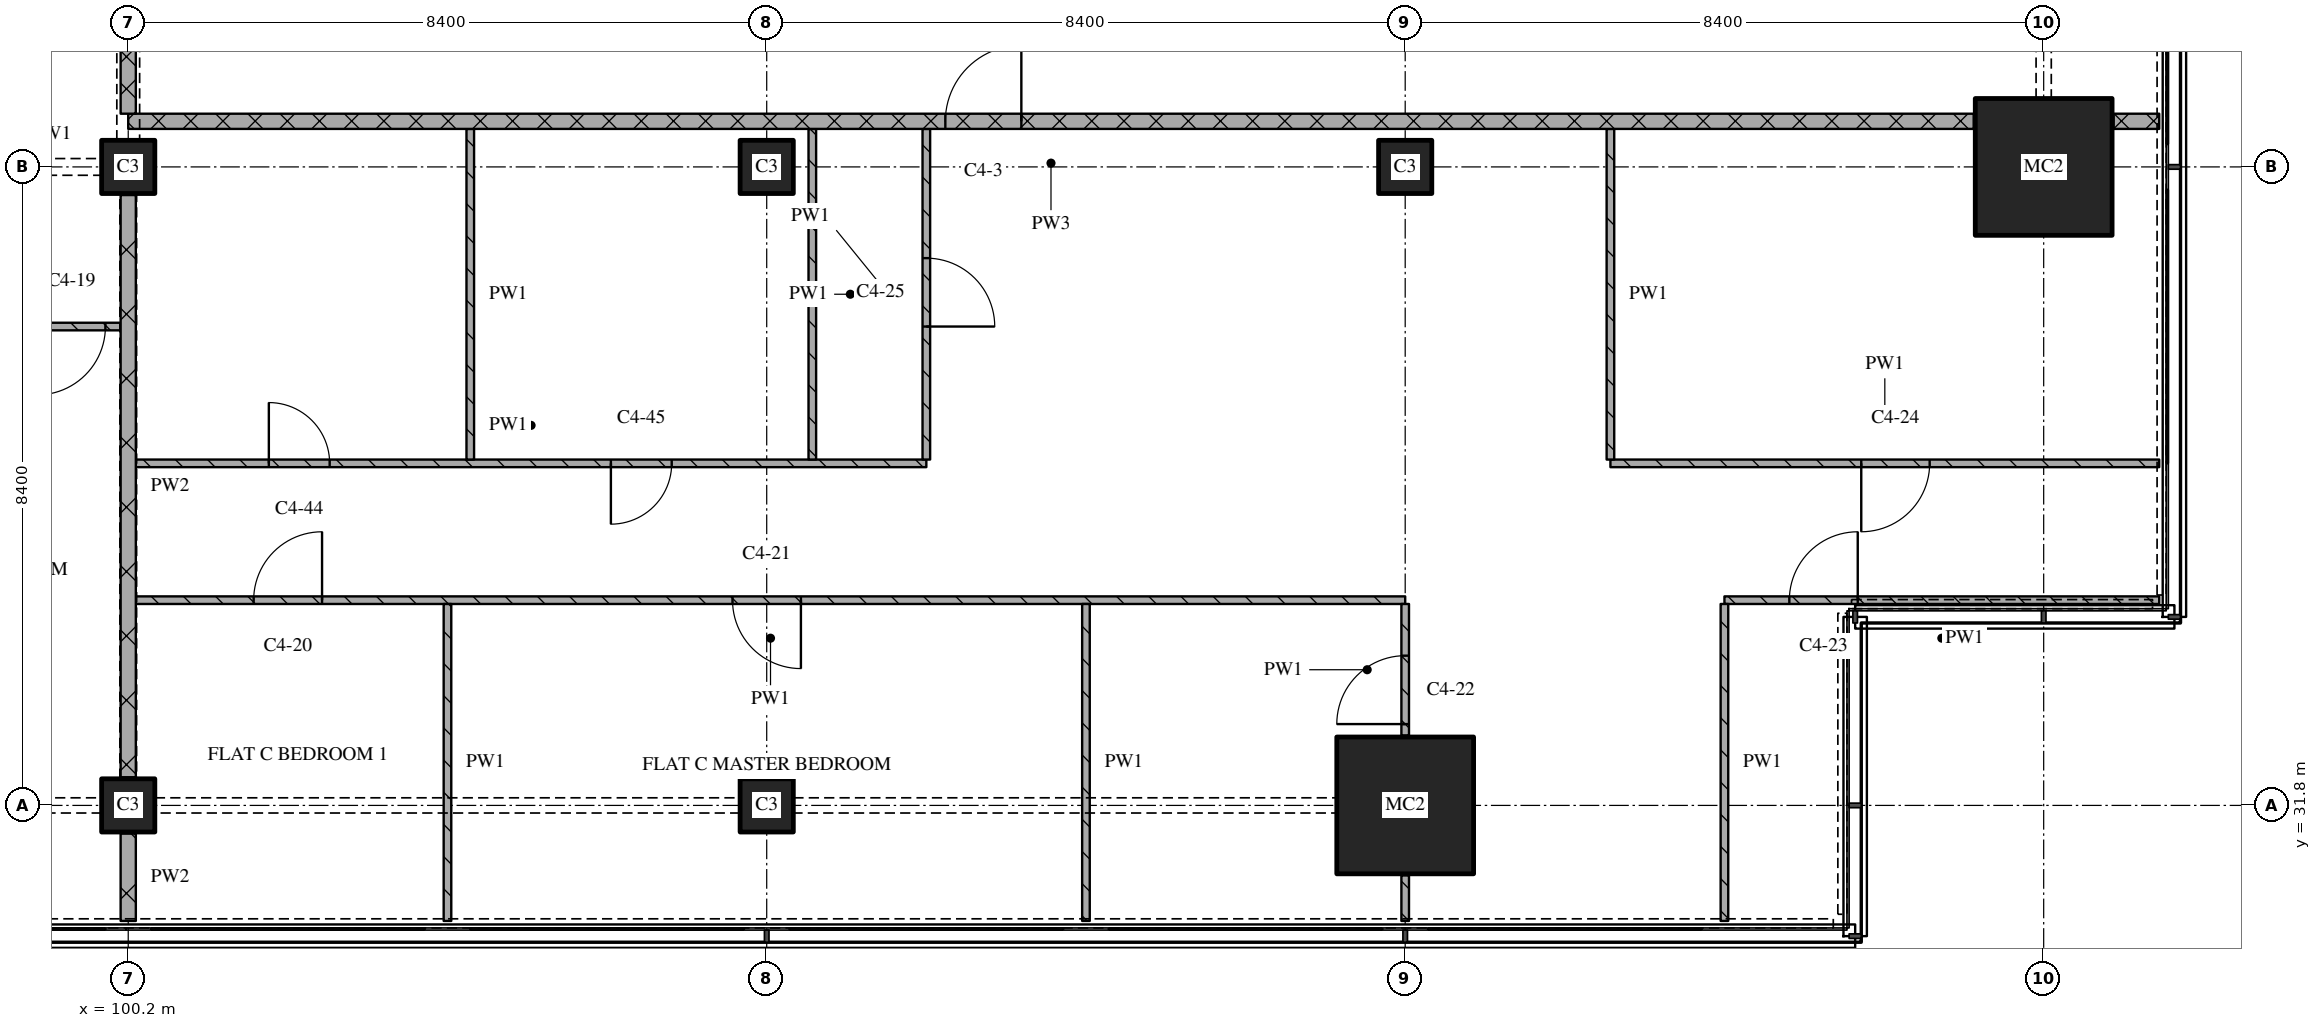
"""IFC4 building model, lengths in metres.
Left out: names, types, materials, properties, quantities, classifications, styles, units other than length and angle.
Written with IfcOpenShell. Run it as: python <this file> out.ifc"""

import sys

from ifc_helpers import new_model, si_unit, direction, frame, frame_2d, origin, origin_2d, place, context, subcontext, project, spatial, rectangle, extrude, element, fill, save


model = new_model("IFC4")
c1 = context("Model", 3, precision=1e-05, world=origin(), true_north=direction((0.0, 1.0)))
c2 = subcontext(c1, "Body", "Model", "MODEL_VIEW")
j1 = project(units=[si_unit("LENGTHUNIT", "METRE"), si_unit("PLANEANGLEUNIT", "RADIAN")], contexts=[c1])
p1 = place(None, origin())
s1 = spatial("IfcSite", under=j1, at=p1, CompositionType="ELEMENT")
p2 = place(p1, origin())
s2 = spatial("IfcBuilding", under=s1, at=p2, CompositionType="ELEMENT")
p3 = place(p2, frame((0.0, 0.0, 183.45)))
s3 = spatial("IfcBuildingStorey", under=s2, at=p3, CompositionType="ELEMENT", Elevation=183.45)
for number, where, z_axis, x_axis in (
    (1, (100.2, 31.8, 0.0), (0.0, 0.0, 1.0), (1.0, 0.0, 0.0)),
    (2, (100.2, 40.2, 0.0), (0.0, 0.0, 1.0), (1.0, 0.0, 0.0)),
    (3, (108.6, 31.8, 0.0), (0.0, 0.0, 1.0), (1.0, 0.0, 0.0)),
    (4, (108.6, 40.2, 0.0), (0.0, 0.0, 1.0), (1.0, 0.0, 0.0)),
):
    element("IfcColumn", number, at=place(p3, frame(where, z_axis=z_axis, x_axis=x_axis)), inside=s3, PredefinedType="COLUMN", context=c2, shape_type="SweptSolid", body=[
        extrude(rectangle(XDim=0.7, YDim=0.7, at=origin_2d()), origin(), (0.0, 0.0, 1.0), 3.6),
    ])
p4 = place(p3, frame((117.0, 31.8, 0.0), z_axis=(0.0, 0.0, 1.0), x_axis=(1.0, 0.0, 0.0)))
e5 = element("IfcColumn", 5, at=p4, inside=s3, PredefinedType="COLUMN", context=c2, shape_type="SweptSolid", body=[
    extrude(rectangle(XDim=1.8, YDim=1.8, at=origin_2d()), origin(), (0.0, 0.0, 1.0), 3.6),
])
p5 = place(p3, frame((117.0, 40.2, 0.0), z_axis=(0.0, 0.0, 1.0), x_axis=(1.0, 0.0, 0.0)))
e6 = element("IfcColumn", 6, at=p5, inside=s3, PredefinedType="COLUMN", context=c2, shape_type="SweptSolid", body=[
    extrude(rectangle(XDim=0.7, YDim=0.7, at=origin_2d()), origin(), (0.0, 0.0, 1.0), 3.6),
])
p6 = place(p3, frame((125.4, 40.2, 0.0), z_axis=(0.0, 0.0, 1.0), x_axis=(1.0, 0.0, 0.0)))
e7 = element("IfcColumn", 7, at=p6, inside=s3, PredefinedType="COLUMN", context=c2, shape_type="SweptSolid", body=[
    extrude(rectangle(XDim=1.8, YDim=1.8, at=origin_2d()), origin(), (0.0, 0.0, 1.0), 3.6),
])
p7 = place(p3, frame((117.0, 34.5, 0.0), z_axis=(0.0, 0.0, 1.0), x_axis=(-1.0, 0.0, 0.0)))
e8 = element("IfcWall", 8, at=p7, inside=s3, PredefinedType="PARTITIONING", context=c2, shape_type="SweptSolid", body=[
    extrude(rectangle(XDim=16.7, YDim=0.1, at=frame_2d((8.35, 0.0))), origin(), (0.0, 0.0, 1.0), 3.32),
])
p8 = place(p7, frame((7.95, 0.0, 0.0)))
e9 = element("IfcOpeningElement", 9, at=p8, cuts=e8, PredefinedType="OPENING", context=c2, shape_type="SweptSolid", body=[
    extrude(rectangle(XDim=0.9, YDim=2.1, at=frame_2d((0.45, 1.05))), frame((0.0, 0.06, 0.0), z_axis=(0.0, -1.0, 0.0), x_axis=(1.0, 0.0, 0.0)), (0.0, 0.0, 1.0), 0.12),
])
p9 = place(p7, frame((14.25, 0.0, 0.0)))
e10 = element("IfcOpeningElement", 10, at=p9, cuts=e8, PredefinedType="OPENING", context=c2, shape_type="SweptSolid", body=[
    extrude(rectangle(XDim=0.9, YDim=2.1, at=frame_2d((0.45, 1.05))), frame((0.0, 0.06, 0.0), z_axis=(0.0, -1.0, 0.0), x_axis=(1.0, 0.0, 0.0)), (0.0, 0.0, 1.0), 0.12),
])
p10 = place(p3, frame((126.92, 34.5, 0.0), z_axis=(0.0, 0.0, 1.0), x_axis=(-1.0, 0.0, 0.0)))
e11 = element("IfcWall", 11, at=p10, inside=s3, PredefinedType="PARTITIONING", context=c2, shape_type="SweptSolid", body=[
    extrude(rectangle(XDim=5.72, YDim=0.1, at=frame_2d((2.86, 0.0))), origin(), (0.0, 0.0, 1.0), 3.32),
])
p11 = place(p10, frame((3.966, 0.0, 0.0)))
e12 = element("IfcOpeningElement", 12, at=p11, cuts=e11, PredefinedType="OPENING", context=c2, shape_type="SweptSolid", body=[
    extrude(rectangle(XDim=0.9, YDim=2.1, at=frame_2d((0.45, 1.05))), frame((0.0, 0.06, 0.0), z_axis=(0.0, -1.0, 0.0), x_axis=(1.0, 0.0, 0.0)), (0.0, 0.0, 1.0), 0.12),
])
p12 = place(p3, frame((100.3, 36.3, 0.0), z_axis=(0.0, 0.0, 1.0), x_axis=(1.0, 0.0, 0.0)))
e13 = element("IfcWall", 13, at=p12, inside=s3, PredefinedType="PARTITIONING", context=c2, shape_type="SweptSolid", body=[
    extrude(rectangle(XDim=10.4, YDim=0.1, at=frame_2d((5.2, 0.0))), origin(), (0.0, 0.0, 1.0), 3.32),
])
p13 = place(p12, frame((1.75, 0.0, 0.0)))
e14 = element("IfcOpeningElement", 14, at=p13, cuts=e13, PredefinedType="OPENING", context=c2, shape_type="SweptSolid", body=[
    extrude(rectangle(XDim=0.8, YDim=2.1, at=frame_2d((0.4, 1.05))), frame((0.0, 0.06, 0.0), z_axis=(0.0, -1.0, 0.0), x_axis=(1.0, 0.0, 0.0)), (0.0, 0.0, 1.0), 0.12),
])
p14 = place(p12, frame((6.25, 0.0, 0.0)))
e15 = element("IfcOpeningElement", 15, at=p14, cuts=e13, PredefinedType="OPENING", context=c2, shape_type="SweptSolid", body=[
    extrude(rectangle(XDim=0.8, YDim=2.1, at=frame_2d((0.4, 1.05))), frame((0.0, 0.06, 0.0), z_axis=(0.0, -1.0, 0.0), x_axis=(1.0, 0.0, 0.0)), (0.0, 0.0, 1.0), 0.12),
])
p15 = place(p3, frame((119.7, 36.3, 0.0), z_axis=(0.0, 0.0, 1.0), x_axis=(1.0, 0.0, 0.0)))
e16 = element("IfcWall", 16, at=p15, inside=s3, PredefinedType="PARTITIONING", context=c2, shape_type="SweptSolid", body=[
    extrude(rectangle(XDim=7.22, YDim=0.1, at=frame_2d((3.61, 0.0))), origin(), (0.0, 0.0, 1.0), 3.32),
])
p16 = place(p15, frame((3.3, 0.0, 0.0)))
e17 = element("IfcOpeningElement", 17, at=p16, cuts=e16, PredefinedType="OPENING", context=c2, shape_type="SweptSolid", body=[
    extrude(rectangle(XDim=0.9, YDim=2.1, at=frame_2d((0.45, 1.05))), frame((0.0, 0.06, 0.0), z_axis=(0.0, -1.0, 0.0), x_axis=(1.0, 0.0, 0.0)), (0.0, 0.0, 1.0), 0.12),
])
p17 = place(p3, frame((89.7, 38.1, 0.0), z_axis=(0.0, 0.0, 1.0), x_axis=(1.0, 0.0, 0.0)))
e18 = element("IfcWall", 18, at=p17, inside=s3, PredefinedType="PARTITIONING", context=c2, shape_type="SweptSolid", body=[
    extrude(rectangle(XDim=10.4, YDim=0.1, at=frame_2d((5.2, 0.0))), origin(), (0.0, 0.0, 1.0), 3.32),
])
p18 = place(p17, frame((6.35, 0.0, 0.0)))
e19 = element("IfcOpeningElement", 19, at=p18, cuts=e18, PredefinedType="OPENING", context=c2, shape_type="SweptSolid", body=[
    extrude(rectangle(XDim=0.8, YDim=2.1, at=frame_2d((0.4, 1.05))), frame((0.0, 0.06, 0.0), z_axis=(0.0, -1.0, 0.0), x_axis=(1.0, 0.0, 0.0)), (0.0, 0.0, 1.0), 0.12),
])
p19 = place(p17, frame((9.3, 0.0, 0.0)))
e20 = element("IfcOpeningElement", 20, at=p19, cuts=e18, PredefinedType="OPENING", context=c2, shape_type="SweptSolid", body=[
    extrude(rectangle(XDim=0.9, YDim=2.1, at=frame_2d((0.45, 1.05))), frame((0.0, 0.06, 0.0), z_axis=(0.0, -1.0, 0.0), x_axis=(1.0, 0.0, 0.0)), (0.0, 0.0, 1.0), 0.12),
])
p20 = place(p3, frame((124.48, 40.8, 0.0), z_axis=(0.0, 0.0, 1.0), x_axis=(-1.0, 0.0, 0.0)))
e21 = element("IfcWall", 21, at=p20, inside=s3, PredefinedType="PARTITIONING", context=c2, shape_type="SweptSolid", body=[
    extrude(rectangle(XDim=24.28, YDim=0.2, at=frame_2d((12.14, 0.0))), origin(), (0.0, 0.0, 1.0), 3.32),
])
p21 = place(p20, frame((12.53, 0.0, 0.0)))
e22 = element("IfcOpeningElement", 22, at=p21, cuts=e21, PredefinedType="OPENING", context=c2, shape_type="SweptSolid", body=[
    extrude(rectangle(XDim=1.0, YDim=2.1, at=frame_2d((0.5, 1.05))), frame((0.0, 0.11, 0.0), z_axis=(0.0, -1.0, 0.0), x_axis=(1.0, 0.0, 0.0)), (0.0, 0.0, 1.0), 0.22),
])
p22 = place(p3, frame((126.32, 40.8, 0.0), z_axis=(0.0, 0.0, 1.0), x_axis=(1.0, 0.0, 0.0)))
e23 = element("IfcWall", 23, at=p22, inside=s3, PredefinedType="PARTITIONING", context=c2, shape_type="SweptSolid", body=[
    extrude(rectangle(XDim=0.6, YDim=0.2, at=frame_2d((0.3, 0.0))), origin(), (0.0, 0.0, 1.0), 3.32),
])
p23 = place(p3, frame((100.2, 43.1, 0.0), z_axis=(0.0, 0.0, 1.0), x_axis=(0.0, -1.0, 0.0)))
e24 = element("IfcWall", 24, at=p23, inside=s3, PredefinedType="PARTITIONING", context=c2, shape_type="SweptSolid", body=[
    extrude(rectangle(XDim=2.2, YDim=0.2, at=frame_2d((1.1, 0.0))), origin(), (0.0, 0.0, 1.0), 2.43),
])
p24 = place(p3, frame((100.2, 31.43, 0.0), z_axis=(0.0, 0.0, 1.0), x_axis=(0.0, -1.0, 0.0)))
e25 = element("IfcWall", 25, at=p24, inside=s3, PredefinedType="PARTITIONING", context=c2, shape_type="SweptSolid", body=[
    extrude(rectangle(XDim=1.15, YDim=0.2, at=frame_2d((0.575, 0.0))), origin(), (0.0, 0.0, 1.0), 3.32),
])
p25 = place(p3, frame((100.2, 39.83, 0.0), z_axis=(0.0, 0.0, 1.0), x_axis=(0.0, -1.0, 0.0)))
e26 = element("IfcWall", 26, at=p25, inside=s3, PredefinedType="PARTITIONING", context=c2, shape_type="SweptSolid", body=[
    extrude(rectangle(XDim=7.66, YDim=0.2, at=frame_2d((3.83, 0.0))), origin(), (0.0, 0.0, 1.0), 2.72),
])
p26 = place(p3, frame((104.4, 34.45, 0.0), z_axis=(0.0, 0.0, 1.0), x_axis=(0.0, -1.0, 0.0)))
e27 = element("IfcWall", 27, at=p26, inside=s3, PredefinedType="PARTITIONING", context=c2, shape_type="SweptSolid", body=[
    extrude(rectangle(XDim=4.17, YDim=0.1, at=frame_2d((2.085, 0.0))), origin(), (0.0, 0.0, 1.0), 3.32),
])
for number, where, z_axis, x_axis in (
    (28, (104.7, 40.7, 0.0), (0.0, 0.0, 1.0), (0.0, -1.0, 0.0)),
    (29, (109.2, 40.7, 0.0), (0.0, 0.0, 1.0), (0.0, -1.0, 0.0)),
):
    element("IfcWall", number, at=place(p3, frame(where, z_axis=z_axis, x_axis=x_axis)), inside=s3, PredefinedType="PARTITIONING", context=c2, shape_type="SweptSolid", body=[
        extrude(rectangle(XDim=4.35, YDim=0.1, at=frame_2d((2.175, 0.0))), origin(), (0.0, 0.0, 1.0), 3.32),
    ])
p27 = place(p3, frame((110.7, 36.35, 0.0), z_axis=(0.0, 0.0, 1.0), x_axis=(0.0, 1.0, 0.0)))
e30 = element("IfcWall", 30, at=p27, inside=s3, PredefinedType="PARTITIONING", context=c2, shape_type="SweptSolid", body=[
    extrude(rectangle(XDim=4.35, YDim=0.1, at=frame_2d((2.175, 0.0))), origin(), (0.0, 0.0, 1.0), 3.32),
])
p28 = place(p27, frame((1.75, 0.0, 0.0)))
e31 = element("IfcOpeningElement", 31, at=p28, cuts=e30, PredefinedType="OPENING", context=c2, shape_type="SweptSolid", body=[
    extrude(rectangle(XDim=0.9, YDim=2.1, at=frame_2d((0.45, 1.05))), frame((0.0, 0.06, 0.0), z_axis=(0.0, -1.0, 0.0), x_axis=(1.0, 0.0, 0.0)), (0.0, 0.0, 1.0), 0.12),
])
p29 = place(p3, frame((112.8, 34.45, 0.0), z_axis=(0.0, 0.0, 1.0), x_axis=(0.0, -1.0, 0.0)))
e32 = element("IfcWall", 32, at=p29, inside=s3, PredefinedType="PARTITIONING", context=c2, shape_type="SweptSolid", body=[
    extrude(rectangle(XDim=4.17, YDim=0.1, at=frame_2d((2.085, 0.0))), origin(), (0.0, 0.0, 1.0), 3.32),
])
p30 = place(p3, frame((117.0, 30.88, 0.0), z_axis=(0.0, 0.0, 1.0), x_axis=(0.0, -1.0, 0.0)))
e33 = element("IfcWall", 33, at=p30, inside=s3, PredefinedType="PARTITIONING", context=c2, shape_type="SweptSolid", body=[
    extrude(rectangle(XDim=0.6, YDim=0.1, at=frame_2d((0.3, 0.0))), origin(), (0.0, 0.0, 1.0), 3.32),
])
p31 = place(p3, frame((117.0, 32.72, 0.0), z_axis=(0.0, 0.0, 1.0), x_axis=(0.0, 1.0, 0.0)))
e34 = element("IfcWall", 34, at=p31, inside=s3, PredefinedType="PARTITIONING", context=c2, shape_type="SweptSolid", body=[
    extrude(rectangle(XDim=1.73, YDim=0.1, at=frame_2d((0.865, 0.0))), origin(), (0.0, 0.0, 1.0), 3.32),
])
p32 = place(p31, frame((0.15, 0.0, 0.0)))
e35 = element("IfcOpeningElement", 35, at=p32, cuts=e34, PredefinedType="OPENING", context=c2, shape_type="SweptSolid", body=[
    extrude(rectangle(XDim=0.9, YDim=2.1, at=frame_2d((0.45, 1.05))), frame((0.0, 0.06, 0.0), z_axis=(0.0, -1.0, 0.0), x_axis=(1.0, 0.0, 0.0)), (0.0, 0.0, 1.0), 0.12),
])
p33 = place(p3, frame((119.7, 40.7, 0.0), z_axis=(0.0, 0.0, 1.0), x_axis=(0.0, -1.0, 0.0)))
e36 = element("IfcWall", 36, at=p33, inside=s3, PredefinedType="PARTITIONING", context=c2, shape_type="SweptSolid", body=[
    extrude(rectangle(XDim=4.35, YDim=0.1, at=frame_2d((2.175, 0.0))), origin(), (0.0, 0.0, 1.0), 3.32),
])
p34 = place(p3, frame((121.2, 34.45, 0.0), z_axis=(0.0, 0.0, 1.0), x_axis=(0.0, -1.0, 0.0)))
e37 = element("IfcWall", 37, at=p34, inside=s3, PredefinedType="PARTITIONING", context=c2, shape_type="SweptSolid", body=[
    extrude(rectangle(XDim=4.17, YDim=0.1, at=frame_2d((2.085, 0.0))), origin(), (0.0, 0.0, 1.0), 3.32),
])
p35 = place(p8, origin())
e38 = element("IfcDoor", 38, at=p35, inside=s3, OperationType="SINGLE_SWING_LEFT", PredefinedType="DOOR", context=c2, shape_type="SweptSolid", body=[
    extrude(rectangle(XDim=0.9, YDim=2.1, at=frame_2d((0.45, 1.05))), frame((0.0, 0.025, 0.0), z_axis=(0.0, -1.0, 0.0), x_axis=(1.0, 0.0, 0.0)), (0.0, 0.0, 1.0), 0.05),
])
fill(e9, e38)
p36 = place(p9, origin())
e39 = element("IfcDoor", 39, at=p36, inside=s3, OperationType="SINGLE_SWING_RIGHT", PredefinedType="DOOR", context=c2, shape_type="SweptSolid", body=[
    extrude(rectangle(XDim=0.9, YDim=2.1, at=frame_2d((0.45, 1.05))), frame((0.0, 0.025, 0.0), z_axis=(0.0, -1.0, 0.0), x_axis=(1.0, 0.0, 0.0)), (0.0, 0.0, 1.0), 0.05),
])
fill(e10, e39)
p37 = place(p11, origin())
e40 = element("IfcDoor", 40, at=p37, inside=s3, OperationType="SINGLE_SWING_RIGHT", PredefinedType="DOOR", context=c2, shape_type="SweptSolid", body=[
    extrude(rectangle(XDim=0.9, YDim=2.1, at=frame_2d((0.45, 1.05))), frame((0.0, 0.025, 0.0), z_axis=(0.0, -1.0, 0.0), x_axis=(1.0, 0.0, 0.0)), (0.0, 0.0, 1.0), 0.05),
])
fill(e12, e40)
p38 = place(p13, origin())
e41 = element("IfcDoor", 41, at=p38, inside=s3, OperationType="SINGLE_SWING_LEFT", PredefinedType="DOOR", context=c2, shape_type="SweptSolid", body=[
    extrude(rectangle(XDim=0.8, YDim=2.1, at=frame_2d((0.4, 1.05))), frame((0.0, 0.025, 0.0), z_axis=(0.0, -1.0, 0.0), x_axis=(1.0, 0.0, 0.0)), (0.0, 0.0, 1.0), 0.05),
])
fill(e14, e41)
p39 = place(p14, origin())
e42 = element("IfcDoor", 42, at=p39, inside=s3, OperationType="SINGLE_SWING_RIGHT", PredefinedType="DOOR", context=c2, shape_type="SweptSolid", body=[
    extrude(rectangle(XDim=0.8, YDim=2.1, at=frame_2d((0.4, 1.05))), frame((0.0, 0.025, 0.0), z_axis=(0.0, -1.0, 0.0), x_axis=(1.0, 0.0, 0.0)), (0.0, 0.0, 1.0), 0.05),
])
fill(e15, e42)
p40 = place(p16, origin())
e43 = element("IfcDoor", 43, at=p40, inside=s3, OperationType="SINGLE_SWING_RIGHT", PredefinedType="DOOR", context=c2, shape_type="SweptSolid", body=[
    extrude(rectangle(XDim=0.9, YDim=2.1, at=frame_2d((0.45, 1.05))), frame((0.0, 0.025, 0.0), z_axis=(0.0, -1.0, 0.0), x_axis=(1.0, 0.0, 0.0)), (0.0, 0.0, 1.0), 0.05),
])
fill(e17, e43)
p41 = place(p19, origin())
e44 = element("IfcDoor", 44, at=p41, inside=s3, OperationType="SINGLE_SWING_RIGHT", PredefinedType="DOOR", context=c2, shape_type="SweptSolid", body=[
    extrude(rectangle(XDim=0.9, YDim=2.1, at=frame_2d((0.45, 1.05))), frame((0.0, 0.025, 0.0), z_axis=(0.0, -1.0, 0.0), x_axis=(1.0, 0.0, 0.0)), (0.0, 0.0, 1.0), 0.05),
])
fill(e20, e44)
p42 = place(p21, origin())
e45 = element("IfcDoor", 45, at=p42, inside=s3, OperationType="SINGLE_SWING_RIGHT", PredefinedType="DOOR", context=c2, shape_type="SweptSolid", body=[
    extrude(rectangle(XDim=1.0, YDim=2.1, at=frame_2d((0.5, 1.05))), frame((0.0, 0.025, 0.0), z_axis=(0.0, -1.0, 0.0), x_axis=(1.0, 0.0, 0.0)), (0.0, 0.0, 1.0), 0.05),
])
fill(e22, e45)
p43 = place(p28, origin())
e46 = element("IfcDoor", 46, at=p43, inside=s3, OperationType="SINGLE_SWING_RIGHT", PredefinedType="DOOR", context=c2, shape_type="SweptSolid", body=[
    extrude(rectangle(XDim=0.9, YDim=2.1, at=frame_2d((0.45, 1.05))), frame((0.0, 0.025, 0.0), z_axis=(0.0, -1.0, 0.0), x_axis=(1.0, 0.0, 0.0)), (0.0, 0.0, 1.0), 0.05),
])
fill(e31, e46)
p44 = place(p32, origin())
e47 = element("IfcDoor", 47, at=p44, inside=s3, OperationType="SINGLE_SWING_LEFT", PredefinedType="DOOR", context=c2, shape_type="SweptSolid", body=[
    extrude(rectangle(XDim=0.9, YDim=2.1, at=frame_2d((0.45, 1.05))), frame((0.0, 0.025, 0.0), z_axis=(0.0, -1.0, 0.0), x_axis=(1.0, 0.0, 0.0)), (0.0, 0.0, 1.0), 0.05),
])
fill(e35, e47)
save(model, sys.argv[1])
